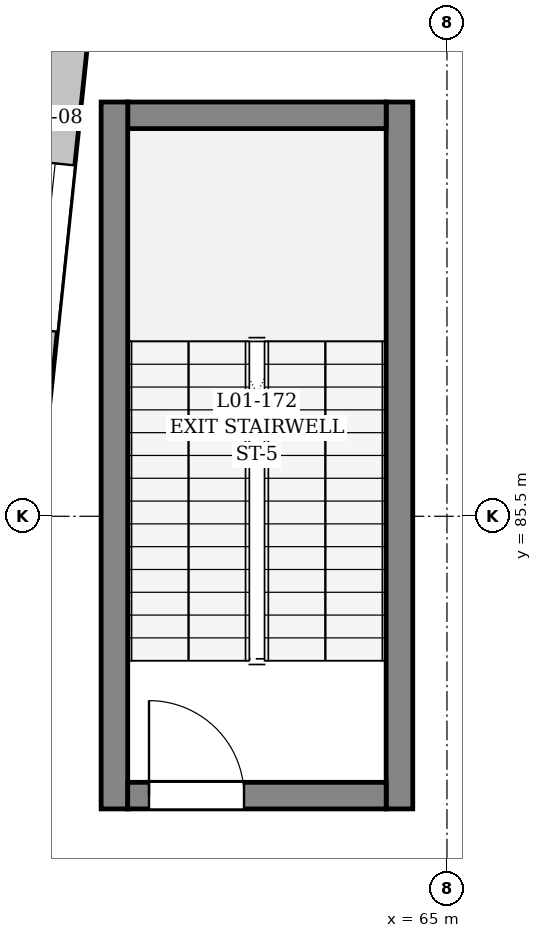
"""IFC4 building model, lengths in metres.
Left out: names, types, materials, properties, quantities, classifications, styles, units other than length and angle.
Written with IfcOpenShell. Run it as: python <this file> out.ifc"""

import sys

from ifc_helpers import new_model, si_unit, direction, frame, frame_2d, origin, place, context, subcontext, project, spatial, rectangle, extrude, element, fill, save


model = new_model("IFC4")
c1 = context("Model", 3, precision=1e-05, world=origin(), true_north=direction((0.0, 1.0)))
c2 = subcontext(c1, "Body", "Model", "MODEL_VIEW")
j1 = project(units=[si_unit("LENGTHUNIT", "METRE"), si_unit("PLANEANGLEUNIT", "RADIAN")], contexts=[c1])
p1 = place(None, origin())
s1 = spatial("IfcSite", under=j1, at=p1, CompositionType="ELEMENT")
p2 = place(p1, origin())
s2 = spatial("IfcBuilding", under=s1, at=p2, CompositionType="ELEMENT")
p3 = place(p2, origin())
s3 = spatial("IfcBuildingStorey", under=s2, at=p3, CompositionType="ELEMENT", Elevation=0.0)
p4 = place(p3, frame((59.311, 85.06, 0.0), z_axis=(0.0, 0.0, 1.0), x_axis=(0.104529993567, 0.994521734526, 0.0)))
e1 = element("IfcWall", 1, at=p4, inside=s3, PredefinedType="SOLIDWALL", context=c2, shape_type="SweptSolid", body=[
    extrude(rectangle(XDim=11.823, YDim=0.52, at=frame_2d((5.911, 0.0))), origin(), (0.0, 0.0, 1.0), 5.1),
])
p5 = place(p4, frame((2.911, 0.0, 0.9)))
e2 = element("IfcOpeningElement", 2, at=p5, cuts=e1, PredefinedType="OPENING", context=c2, shape_type="SweptSolid", body=[
    extrude(rectangle(XDim=2.2, YDim=1.8, at=frame_2d((1.1, 0.9))), frame((0.0, 0.27, 0.0), z_axis=(0.0, -1.0, 0.0), x_axis=(1.0, 0.0, 0.0)), (0.0, 0.0, 1.0), 0.54),
])
p6 = place(p4, frame((6.711, 0.0, 0.9)))
e3 = element("IfcOpeningElement", 3, at=p6, cuts=e1, PredefinedType="OPENING", context=c2, shape_type="SweptSolid", body=[
    extrude(rectangle(XDim=2.2, YDim=1.8, at=frame_2d((1.1, 0.9))), frame((0.0, 0.27, 0.0), z_axis=(0.0, -1.0, 0.0), x_axis=(1.0, 0.0, 0.0)), (0.0, 0.0, 1.0), 0.54),
])
p7 = place(p3, frame((64.375, 81.65, 0.0), z_axis=(0.0, 0.0, 1.0), x_axis=(0.0, 1.0, 0.0)))
e4 = element("IfcWall", 4, at=p7, inside=s3, PredefinedType="SHEAR", context=c2, shape_type="SweptSolid", body=[
    extrude(rectangle(XDim=9.3, YDim=0.35, at=frame_2d((4.65, 0.0))), origin(), (0.0, 0.0, 1.0), 5.1),
])
p8 = place(p3, frame((64.2, 90.775, 0.0), z_axis=(0.0, 0.0, 1.0), x_axis=(-1.0, 0.0, 0.0)))
e5 = element("IfcWall", 5, at=p8, inside=s3, PredefinedType="SHEAR", context=c2, shape_type="SweptSolid", body=[
    extrude(rectangle(XDim=3.4, YDim=0.35, at=frame_2d((1.7, 0.0))), origin(), (0.0, 0.0, 1.0), 5.1),
])
p9 = place(p3, frame((60.625, 90.95, 0.0), z_axis=(0.0, 0.0, 1.0), x_axis=(0.0, -1.0, 0.0)))
e6 = element("IfcWall", 6, at=p9, inside=s3, PredefinedType="SHEAR", context=c2, shape_type="SweptSolid", body=[
    extrude(rectangle(XDim=9.3, YDim=0.35, at=frame_2d((4.65, 0.0))), origin(), (0.0, 0.0, 1.0), 5.1),
])
p10 = place(p3, frame((60.8, 81.825, 0.0), z_axis=(0.0, 0.0, 1.0), x_axis=(1.0, 0.0, 0.0)))
e7 = element("IfcWall", 7, at=p10, inside=s3, PredefinedType="SHEAR", context=c2, shape_type="SweptSolid", body=[
    extrude(rectangle(XDim=3.4, YDim=0.35, at=frame_2d((1.7, 0.0))), origin(), (0.0, 0.0, 1.0), 5.1),
])
p11 = place(p10, frame((0.28, 0.0, 0.0)))
e8 = element("IfcOpeningElement", 8, at=p11, cuts=e7, PredefinedType="OPENING", context=c2, shape_type="SweptSolid", body=[
    extrude(rectangle(XDim=1.25, YDim=2.2, at=frame_2d((0.625, 1.1))), frame((0.0, 0.185, 0.0), z_axis=(0.0, -1.0, 0.0), x_axis=(1.0, 0.0, 0.0)), (0.0, 0.0, 1.0), 0.37),
])
p12 = place(p5, origin())
e9 = element("IfcWindow", 9, at=p12, inside=s3, PartitioningType="TRIPLE_PANEL_VERTICAL", PredefinedType="WINDOW", context=c2, shape_type="SweptSolid", body=[
    extrude(rectangle(XDim=2.2, YDim=1.8, at=frame_2d((1.1, 0.9))), frame((0.0, 0.03, 0.0), z_axis=(0.0, -1.0, 0.0), x_axis=(1.0, 0.0, 0.0)), (0.0, 0.0, 1.0), 0.06),
])
fill(e2, e9)
p13 = place(p11, origin())
e10 = element("IfcDoor", 10, at=p13, inside=s3, OperationType="SINGLE_SWING_RIGHT", PredefinedType="DOOR", context=c2, shape_type="SweptSolid", body=[
    extrude(rectangle(XDim=1.25, YDim=2.2, at=frame_2d((0.625, 1.1))), frame((0.0, 0.025, 0.0), z_axis=(0.0, -1.0, 0.0), x_axis=(1.0, 0.0, 0.0)), (0.0, 0.0, 1.0), 0.05),
])
fill(e8, e10)
save(model, sys.argv[1])
